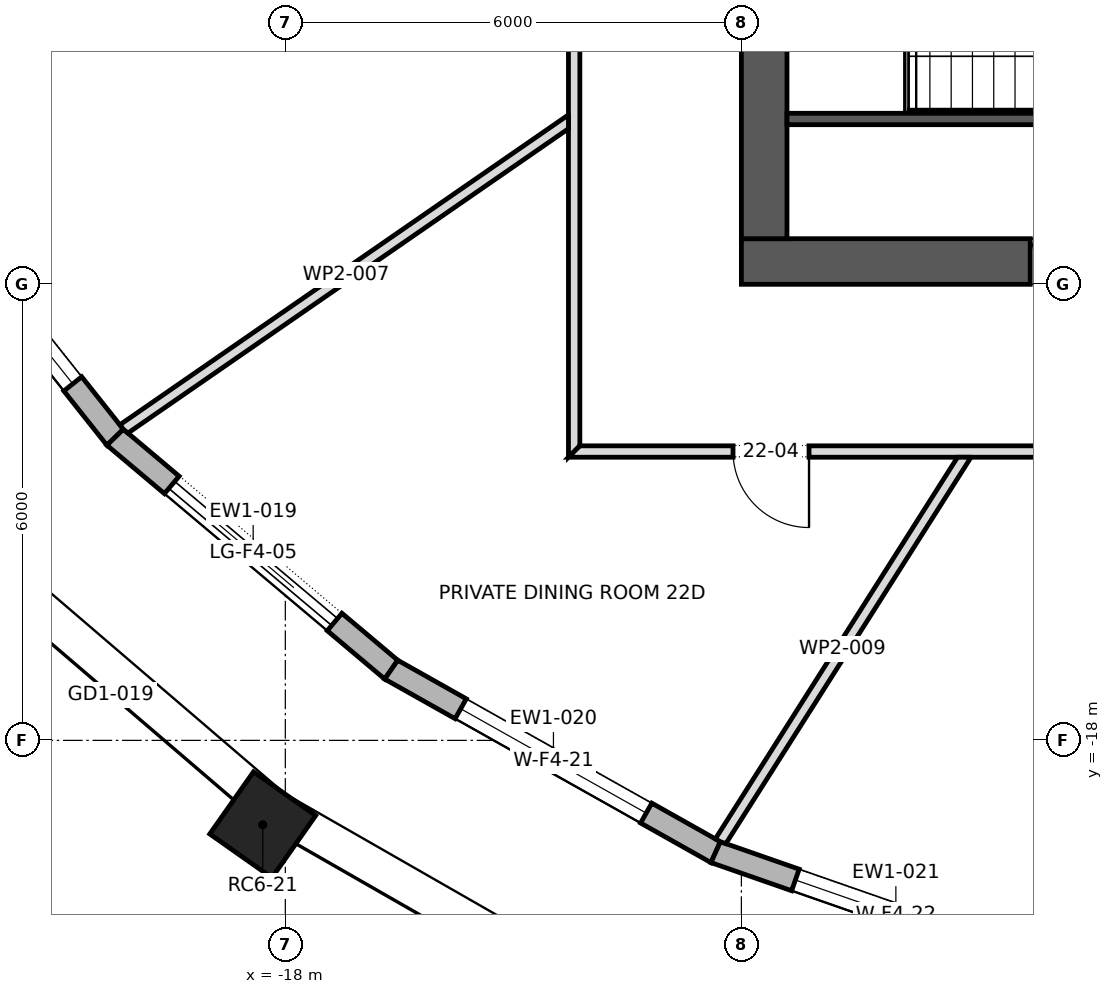
"""IFC4 building model, lengths in metres.
Left out: names, types, materials, properties, quantities, classifications, styles, units other than length and angle.
Written with IfcOpenShell. Run it as: python <this file> out.ifc"""

import sys

from ifc_helpers import new_model, si_unit, direction, frame, frame_2d, origin, origin_2d, place, context, subcontext, project, spatial, polyline, rectangle, outline, extrude, element, fill, save


model = new_model("IFC4")
c1 = context("Model", 3, precision=1e-05, world=origin(), true_north=direction((0.0, 1.0)))
c2 = subcontext(c1, "Body", "Model", "MODEL_VIEW")
j1 = project(units=[si_unit("LENGTHUNIT", "METRE"), si_unit("PLANEANGLEUNIT", "RADIAN")], contexts=[c1])
p1 = place(None, origin())
s1 = spatial("IfcSite", under=j1, at=p1, CompositionType="ELEMENT")
p2 = place(p1, origin())
s2 = spatial("IfcBuilding", under=s1, at=p2, CompositionType="ELEMENT")
p3 = place(p2, frame((0.0, 0.0, 304.3)))
s3 = spatial("IfcBuildingStorey", under=s2, at=p3, CompositionType="ELEMENT", Elevation=304.3)
p4 = place(p3, frame((-18.297, -19.11, 0.0), z_axis=(0.0, 0.0, 1.0), x_axis=(0.81790376713, -0.575355044919, 0.0)))
e1 = element("IfcColumn", 1, at=p4, inside=s3, PredefinedType="COLUMN", context=c2, shape_type="SweptSolid", body=[
    extrude(rectangle(XDim=1.0, YDim=1.0, at=origin_2d()), origin(), (0.0, 0.0, 1.0), 4.0),
])
p5 = place(p3, frame((-12.0, -11.7, 0.0), z_axis=(0.0, 0.0, 1.0), x_axis=(1.0, 0.0, 0.0)))
e2 = element("IfcWall", 2, at=p5, inside=s3, PredefinedType="SHEAR", context=c2, shape_type="SweptSolid", body=[
    extrude(rectangle(XDim=24.0, YDim=0.6, at=frame_2d((12.0, 0.0))), origin(), (0.0, 0.0, 1.0), 4.0),
])
p6 = place(p5, frame((9.975, 0.0, 0.0)))
e3 = element("IfcOpeningElement", 3, at=p6, cuts=e2, PredefinedType="OPENING", context=c2, shape_type="SweptSolid", body=[
    extrude(rectangle(XDim=0.9, YDim=2.1, at=frame_2d((0.45, 1.05))), frame((0.0, 0.312, 0.0), z_axis=(0.0, -1.0, 0.0), x_axis=(1.0, 0.0, 0.0)), (0.0, 0.0, 1.0), 0.624),
])
p7 = place(p5, frame((3.8, 0.0, 0.0)))
e4 = element("IfcOpeningElement", 4, at=p7, cuts=e2, PredefinedType="OPENING", context=c2, shape_type="SweptSolid", body=[
    extrude(rectangle(XDim=0.8, YDim=2.1, at=frame_2d((0.4, 1.05))), frame((0.0, 0.312, 0.0), z_axis=(0.0, -1.0, 0.0), x_axis=(1.0, 0.0, 0.0)), (0.0, 0.0, 1.0), 0.624),
])
p8 = place(p5, frame((5.8, 0.0, 0.0)))
e5 = element("IfcOpeningElement", 5, at=p8, cuts=e2, PredefinedType="OPENING", context=c2, shape_type="SweptSolid", body=[
    extrude(rectangle(XDim=0.8, YDim=2.1, at=frame_2d((0.4, 1.05))), frame((0.0, 0.312, 0.0), z_axis=(0.0, -1.0, 0.0), x_axis=(1.0, 0.0, 0.0)), (0.0, 0.0, 1.0), 0.624),
])
p9 = place(p5, frame((7.5, 0.0, 0.0)))
e6 = element("IfcOpeningElement", 6, at=p9, cuts=e2, PredefinedType="OPENING", context=c2, shape_type="SweptSolid", body=[
    extrude(rectangle(XDim=0.8, YDim=2.1, at=frame_2d((0.4, 1.05))), frame((0.0, 0.312, 0.0), z_axis=(0.0, -1.0, 0.0), x_axis=(1.0, 0.0, 0.0)), (0.0, 0.0, 1.0), 0.624),
])
p10 = place(p5, frame((15.85, 0.0, 0.0)))
e7 = element("IfcOpeningElement", 7, at=p10, cuts=e2, PredefinedType="OPENING", context=c2, shape_type="SweptSolid", body=[
    extrude(rectangle(XDim=0.8, YDim=2.1, at=frame_2d((0.4, 1.05))), frame((0.0, 0.312, 0.0), z_axis=(0.0, -1.0, 0.0), x_axis=(1.0, 0.0, 0.0)), (0.0, 0.0, 1.0), 0.624),
])
p11 = place(p3, frame((-11.7, -11.4, 0.0), z_axis=(0.0, 0.0, 1.0), x_axis=(0.0, 1.0, 0.0)))
e8 = element("IfcWall", 8, at=p11, inside=s3, PredefinedType="SHEAR", context=c2, shape_type="SweptSolid", body=[
    extrude(rectangle(XDim=22.8, YDim=0.6, at=frame_2d((11.4, 0.0))), origin(), (0.0, 0.0, 1.0), 4.0),
])
p12 = place(p11, frame((10.2, 0.0, 0.0)))
e9 = element("IfcOpeningElement", 9, at=p12, cuts=e8, PredefinedType="OPENING", context=c2, shape_type="SweptSolid", body=[
    extrude(rectangle(XDim=2.4, YDim=2.1, at=frame_2d((1.2, 1.05))), frame((0.0, 0.312, 0.0), z_axis=(0.0, -1.0, 0.0), x_axis=(1.0, 0.0, 0.0)), (0.0, 0.0, 1.0), 0.624),
])
p13 = place(p11, frame((18.925, 0.0, 0.0)))
e10 = element("IfcOpeningElement", 10, at=p13, cuts=e8, PredefinedType="OPENING", context=c2, shape_type="SweptSolid", body=[
    extrude(rectangle(XDim=1.2, YDim=2.1, at=frame_2d((0.6, 1.05))), frame((0.0, 0.312, 0.0), z_axis=(0.0, -1.0, 0.0), x_axis=(1.0, 0.0, 0.0)), (0.0, 0.0, 1.0), 0.624),
])
p14 = place(p11, frame((2.675, 0.0, 0.0)))
e11 = element("IfcOpeningElement", 11, at=p14, cuts=e8, PredefinedType="OPENING", context=c2, shape_type="SweptSolid", body=[
    extrude(rectangle(XDim=1.2, YDim=2.1, at=frame_2d((0.6, 1.05))), frame((0.0, 0.312, 0.0), z_axis=(0.0, -1.0, 0.0), x_axis=(1.0, 0.0, 0.0)), (0.0, 0.0, 1.0), 0.624),
])
p15 = place(p3, frame((-23.094, -10.415, 0.0), z_axis=(0.0, 0.0, 1.0), x_axis=(0.621682706372, -0.78326918272, 0.0)))
e12 = element("IfcWall", 12, at=p15, inside=s3, PredefinedType="STANDARD", context=c2, shape_type="SweptSolid", body=[
    extrude(outline(polyline([(-0.016, -0.15), (4.608, -0.15), (4.578, 0.15), (0.016, 0.15), (-0.016, -0.15)])), origin(), (0.0, 0.0, 1.0), 3.7),
])
p16 = place(p15, frame((0.896, 0.0, 0.6)))
e13 = element("IfcOpeningElement", 13, at=p16, cuts=e12, PredefinedType="OPENING", context=c2, shape_type="SweptSolid", body=[
    extrude(rectangle(XDim=2.8, YDim=2.65, at=frame_2d((1.4, 1.325))), frame((0.0, 0.162, 0.0), z_axis=(0.0, -1.0, 0.0), x_axis=(1.0, 0.0, 0.0)), (0.0, 0.0, 1.0), 0.324),
])
p17 = place(p3, frame((-20.239, -14.012, 0.0), z_axis=(0.0, 0.0, 1.0), x_axis=(0.765059193792, -0.643959959931, 0.0)))
e14 = element("IfcWall", 14, at=p17, inside=s3, PredefinedType="STANDARD", context=c2, shape_type="SweptSolid", body=[
    extrude(outline(polyline([(-0.015, -0.15), (4.762, -0.15), (4.734, 0.15), (0.015, 0.15), (-0.015, -0.15)])), origin(), (0.0, 0.0, 1.0), 3.7),
])
p18 = place(p17, frame((0.974, 0.0, 0.0)))
e15 = element("IfcOpeningElement", 15, at=p18, cuts=e14, PredefinedType="OPENING", context=c2, shape_type="SweptSolid", body=[
    extrude(rectangle(XDim=2.8, YDim=3.25, at=frame_2d((1.4, 1.625))), frame((0.0, 0.162, 0.0), z_axis=(0.0, -1.0, 0.0), x_axis=(1.0, 0.0, 0.0)), (0.0, 0.0, 1.0), 0.324),
])
p19 = place(p3, frame((-16.607, -17.07, 0.0), z_axis=(0.0, 0.0, 1.0), x_axis=(0.871570211895, -0.490270706588, 0.0)))
e16 = element("IfcWall", 16, at=p19, inside=s3, PredefinedType="STANDARD", context=c2, shape_type="SweptSolid", body=[
    extrude(outline(polyline([(-0.014, -0.15), (4.911, -0.15), (4.884, 0.15), (0.014, 0.15), (-0.014, -0.15)])), origin(), (0.0, 0.0, 1.0), 3.7),
])
p20 = place(p19, frame((1.049, 0.0, 0.6)))
e17 = element("IfcOpeningElement", 17, at=p20, cuts=e16, PredefinedType="OPENING", context=c2, shape_type="SweptSolid", body=[
    extrude(rectangle(XDim=2.8, YDim=2.65, at=frame_2d((1.4, 1.325))), frame((0.0, 0.162, 0.0), z_axis=(0.0, -1.0, 0.0), x_axis=(1.0, 0.0, 0.0)), (0.0, 0.0, 1.0), 0.324),
])
p21 = place(p3, frame((-12.338, -19.471, 0.0), z_axis=(0.0, 0.0, 1.0), x_axis=(0.944251863618, -0.329223963365, 0.0)))
e18 = element("IfcWall", 18, at=p21, inside=s3, PredefinedType="STANDARD", context=c2, shape_type="SweptSolid", body=[
    extrude(outline(polyline([(-0.013, -0.15), (5.034, -0.15), (5.009, 0.15), (0.013, 0.15), (-0.013, -0.15)])), origin(), (0.0, 0.0, 1.0), 3.7),
])
p22 = place(p21, frame((1.111, 0.0, 0.6)))
e19 = element("IfcOpeningElement", 19, at=p22, cuts=e18, PredefinedType="OPENING", context=c2, shape_type="SweptSolid", body=[
    extrude(rectangle(XDim=2.8, YDim=2.65, at=frame_2d((1.4, 1.325))), frame((0.0, 0.162, 0.0), z_axis=(0.0, -1.0, 0.0), x_axis=(1.0, 0.0, 0.0)), (0.0, 0.0, 1.0), 0.324),
])
p23 = place(p3, frame((-11.4, -9.825, 0.0), z_axis=(0.0, 0.0, 1.0), x_axis=(1.0, 0.0, 0.0)))
e20 = element("IfcWall", 20, at=p23, inside=s3, PredefinedType="SHEAR", context=c2, shape_type="SweptSolid", body=[
    extrude(rectangle(XDim=8.0, YDim=0.15, at=frame_2d((4.0, 0.0))), origin(), (0.0, 0.0, 1.0), 3.7),
])
p24 = place(p3, frame((-14.2, -14.275, 0.0), z_axis=(0.0, 0.0, 1.0), x_axis=(0.0, 1.0, 0.0)))
e21 = element("IfcWall", 21, at=p24, inside=s3, PredefinedType="PARTITIONING", context=c2, shape_type="SweptSolid", body=[
    extrude(outline(polyline([(0.15, -0.075), (2.033, -0.075), (3.917, -0.075), (5.8, -0.075), (7.683, -0.075), (9.567, -0.075), (11.45, -0.075), (13.333, -0.075), (15.217, -0.075), (17.1, -0.075), (18.983, -0.075), (20.866, -0.075), (22.75, -0.075), (24.633, -0.075), (26.517, -0.075), (28.4, -0.075), (28.55, 0.075), (28.55, 0.075), (26.646, 0.075), (24.743, 0.075), (22.84, 0.075), (20.937, 0.075), (19.033, 0.075), (17.13, 0.075), (15.227, 0.075), (13.323, 0.075), (11.42, 0.075), (9.517, 0.075), (7.613, 0.075), (5.71, 0.075), (3.807, 0.075), (1.903, 0.075), (0.0, 0.075), (0.15, -0.075)])), origin(), (0.0, 0.0, 1.0), 3.7),
])
p25 = place(p24, frame((21.465, 0.0, 0.0)))
e22 = element("IfcOpeningElement", 22, at=p25, cuts=e21, PredefinedType="OPENING", context=c2, shape_type="SweptSolid", body=[
    extrude(rectangle(XDim=1.0, YDim=2.1, at=frame_2d((0.5, 1.05))), frame((0.0, 0.087, 0.0), z_axis=(0.0, -1.0, 0.0), x_axis=(1.0, 0.0, 0.0)), (0.0, 0.0, 1.0), 0.174),
])
p26 = place(p24, frame((12.55, 0.0, 0.0)))
e23 = element("IfcOpeningElement", 23, at=p26, cuts=e21, PredefinedType="OPENING", context=c2, shape_type="SweptSolid", body=[
    extrude(rectangle(XDim=1.0, YDim=2.1, at=frame_2d((0.5, 1.05))), frame((0.0, 0.087, 0.0), z_axis=(0.0, -1.0, 0.0), x_axis=(1.0, 0.0, 0.0)), (0.0, 0.0, 1.0), 0.174),
])
p27 = place(p24, frame((7.055, 0.0, 0.0)))
e24 = element("IfcOpeningElement", 24, at=p27, cuts=e21, PredefinedType="OPENING", context=c2, shape_type="SweptSolid", body=[
    extrude(rectangle(XDim=1.0, YDim=2.1, at=frame_2d((0.5, 1.05))), frame((0.0, 0.087, 0.0), z_axis=(0.0, -1.0, 0.0), x_axis=(1.0, 0.0, 0.0)), (0.0, 0.0, 1.0), 0.174),
])
p28 = place(p3, frame((-14.275, -14.2, 0.0), z_axis=(0.0, 0.0, 1.0), x_axis=(1.0, 0.0, 0.0)))
e25 = element("IfcWall", 25, at=p28, inside=s3, PredefinedType="PARTITIONING", context=c2, shape_type="SweptSolid", body=[
    extrude(outline(polyline([(28.55, -0.075), (28.55, -0.075), (28.4, 0.075), (26.517, 0.075), (24.633, 0.075), (22.75, 0.075), (20.866, 0.075), (18.983, 0.075), (17.1, 0.075), (15.217, 0.075), (13.333, 0.075), (11.45, 0.075), (9.567, 0.075), (7.683, 0.075), (5.8, 0.075), (3.917, 0.075), (2.033, 0.075), (0.15, 0.075), (0.0, -0.075), (1.903, -0.075), (3.807, -0.075), (5.71, -0.075), (7.613, -0.075), (9.517, -0.075), (11.42, -0.075), (13.323, -0.075), (15.227, -0.075), (17.13, -0.075), (19.033, -0.075), (20.937, -0.075), (22.84, -0.075), (24.743, -0.075), (26.646, -0.075), (28.55, -0.075)])), origin(), (0.0, 0.0, 1.0), 3.7),
])
p29 = place(p28, frame((2.165, 0.0, 0.0)))
e26 = element("IfcOpeningElement", 26, at=p29, cuts=e25, PredefinedType="OPENING", context=c2, shape_type="SweptSolid", body=[
    extrude(rectangle(XDim=1.0, YDim=2.1, at=frame_2d((0.5, 1.05))), frame((0.0, 0.087, 0.0), z_axis=(0.0, -1.0, 0.0), x_axis=(1.0, 0.0, 0.0)), (0.0, 0.0, 1.0), 0.174),
])
p30 = place(p28, frame((11.825, 0.0, 0.0)))
e27 = element("IfcOpeningElement", 27, at=p30, cuts=e25, PredefinedType="OPENING", context=c2, shape_type="SweptSolid", body=[
    extrude(rectangle(XDim=1.0, YDim=2.1, at=frame_2d((0.5, 1.05))), frame((0.0, 0.087, 0.0), z_axis=(0.0, -1.0, 0.0), x_axis=(1.0, 0.0, 0.0)), (0.0, 0.0, 1.0), 0.174),
])
p31 = place(p28, frame((23.255, 0.0, 0.0)))
e28 = element("IfcOpeningElement", 28, at=p31, cuts=e25, PredefinedType="OPENING", context=c2, shape_type="SweptSolid", body=[
    extrude(rectangle(XDim=1.0, YDim=2.1, at=frame_2d((0.5, 1.05))), frame((0.0, 0.087, 0.0), z_axis=(0.0, -1.0, 0.0), x_axis=(1.0, 0.0, 0.0)), (0.0, 0.0, 1.0), 0.174),
])
p32 = place(p3, frame((-14.232, -9.833, 0.0), z_axis=(0.0, 0.0, 1.0), x_axis=(-0.822725997435, -0.568438152436, 0.0)))
e29 = element("IfcWall", 29, at=p32, inside=s3, PredefinedType="PARTITIONING", context=c2, shape_type="SweptSolid", body=[
    extrude(outline(polyline([(0.0, -0.075), (1.793, -0.075), (3.587, -0.075), (5.38, -0.075), (7.174, -0.075), (7.169, -0.001), (7.148, 0.075), (5.387, 0.075), (3.626, 0.075), (1.865, 0.075), (0.104, 0.075), (0.0, -0.075), (0.0, -0.075)])), origin(), (0.0, 0.0, 1.0), 3.7),
])
p33 = place(p3, frame((-9.042, -14.235, 0.0), z_axis=(0.0, 0.0, 1.0), x_axis=(-0.535766262989, -0.844366337228, 0.0)))
e30 = element("IfcWall", 30, at=p33, inside=s3, PredefinedType="PARTITIONING", context=c2, shape_type="SweptSolid", body=[
    extrude(outline(polyline([(6.041, -0.075), (6.041, -0.067), (6.037, 0.001), (6.02, 0.075), (4.515, 0.075), (3.01, 0.075), (1.505, 0.075), (0.0, 0.075), (0.0, 0.074), (0.095, -0.075), (2.077, -0.075), (4.059, -0.075), (6.041, -0.075)])), origin(), (0.0, 0.0, 1.0), 3.7),
])
p34 = place(p16, origin())
e31 = element("IfcWindow", 31, at=p34, inside=s3, PartitioningType="DOUBLE_PANEL_VERTICAL", PredefinedType="WINDOW", context=c2, shape_type="SweptSolid", body=[
    extrude(rectangle(XDim=2.8, YDim=2.65, at=frame_2d((1.4, 1.325))), frame((0.0, 0.03, 0.0), z_axis=(0.0, -1.0, 0.0), x_axis=(1.0, 0.0, 0.0)), (0.0, 0.0, 1.0), 0.06),
])
fill(e13, e31)
p35 = place(p18, origin())
e32 = element("IfcDoor", 32, at=p35, inside=s3, OperationType="DOUBLE_DOOR_SLIDING", PredefinedType="DOOR", context=c2, shape_type="SweptSolid", body=[
    extrude(rectangle(XDim=2.8, YDim=3.25, at=frame_2d((1.4, 1.625))), frame((0.0, 0.025, 0.0), z_axis=(0.0, -1.0, 0.0), x_axis=(1.0, 0.0, 0.0)), (0.0, 0.0, 1.0), 0.05),
])
fill(e15, e32)
p36 = place(p20, origin())
e33 = element("IfcWindow", 33, at=p36, inside=s3, PartitioningType="DOUBLE_PANEL_VERTICAL", PredefinedType="WINDOW", context=c2, shape_type="SweptSolid", body=[
    extrude(rectangle(XDim=2.8, YDim=2.65, at=frame_2d((1.4, 1.325))), frame((0.0, 0.03, 0.0), z_axis=(0.0, -1.0, 0.0), x_axis=(1.0, 0.0, 0.0)), (0.0, 0.0, 1.0), 0.06),
])
fill(e17, e33)
p37 = place(p22, origin())
e34 = element("IfcWindow", 34, at=p37, inside=s3, PartitioningType="DOUBLE_PANEL_VERTICAL", PredefinedType="WINDOW", context=c2, shape_type="SweptSolid", body=[
    extrude(rectangle(XDim=2.8, YDim=2.65, at=frame_2d((1.4, 1.325))), frame((0.0, 0.03, 0.0), z_axis=(0.0, -1.0, 0.0), x_axis=(1.0, 0.0, 0.0)), (0.0, 0.0, 1.0), 0.06),
])
fill(e19, e34)
p38 = place(p7, origin())
e35 = element("IfcDoor", 35, at=p38, inside=s3, OperationType="SINGLE_SWING_LEFT", PredefinedType="DOOR", context=c2, shape_type="SweptSolid", body=[
    extrude(rectangle(XDim=0.8, YDim=2.1, at=frame_2d((0.4, 1.05))), frame((0.0, 0.025, 0.0), z_axis=(0.0, -1.0, 0.0), x_axis=(1.0, 0.0, 0.0)), (0.0, 0.0, 1.0), 0.05),
])
fill(e4, e35)
p39 = place(p29, frame((1.0, 0.0, 0.0), z_axis=(0.0, 0.0, 1.0), x_axis=(-1.0, 0.0, 0.0)))
e36 = element("IfcDoor", 36, at=p39, inside=s3, OperationType="SINGLE_SWING_RIGHT", PredefinedType="DOOR", context=c2, shape_type="SweptSolid", body=[
    extrude(rectangle(XDim=1.0, YDim=2.1, at=frame_2d((0.5, 1.05))), frame((0.0, 0.025, 0.0), z_axis=(0.0, -1.0, 0.0), x_axis=(1.0, 0.0, 0.0)), (0.0, 0.0, 1.0), 0.05),
])
fill(e26, e36)
save(model, sys.argv[1])
